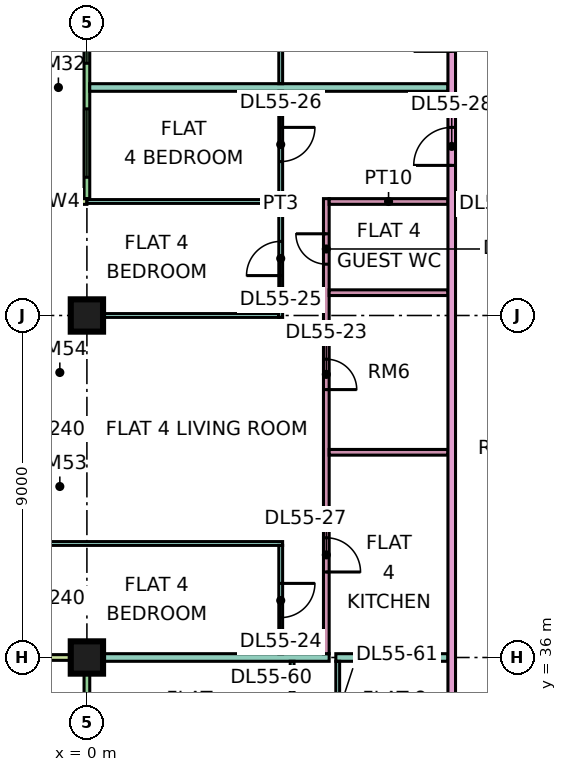
"""IFC4 building model, lengths in metres.
Left out: names, types, materials, properties, quantities, classifications, styles, units other than length and angle.
Written with IfcOpenShell. Run it as: python <this file> out.ifc"""

import sys

from ifc_helpers import new_model, si_unit, direction, frame, frame_2d, origin, origin_2d, place, context, subcontext, project, spatial, rectangle, extrude, element, fill, save


model = new_model("IFC4")
c1 = context("Model", 3, precision=1e-05, world=origin(), true_north=direction((0.0, 1.0)))
c2 = subcontext(c1, "Body", "Model", "MODEL_VIEW")
j1 = project(units=[si_unit("LENGTHUNIT", "METRE"), si_unit("PLANEANGLEUNIT", "RADIAN")], contexts=[c1])
p1 = place(None, origin())
s1 = spatial("IfcSite", under=j1, at=p1, CompositionType="ELEMENT")
p2 = place(p1, origin())
s2 = spatial("IfcBuilding", under=s1, at=p2, CompositionType="ELEMENT")
p3 = place(p2, frame((0.0, 0.0, 234.15)))
s3 = spatial("IfcBuildingStorey", under=s2, at=p3, CompositionType="ELEMENT", Elevation=234.15)
p4 = place(p3, frame((0.0, 36.0, 0.0), z_axis=(0.0, 0.0, 1.0), x_axis=(1.0, 0.0, 0.0)))
e1 = element("IfcColumn", 1, at=p4, inside=s3, PredefinedType="COLUMN", context=c2, shape_type="SweptSolid", body=[
    extrude(rectangle(XDim=0.85, YDim=0.85, at=origin_2d()), origin(), (0.0, 0.0, 1.0), 3.75),
])
p5 = place(p3, frame((0.0, 45.0, 0.0), z_axis=(0.0, 0.0, 1.0), x_axis=(1.0, 0.0, 0.0)))
e2 = element("IfcColumn", 2, at=p5, inside=s3, PredefinedType="COLUMN", context=c2, shape_type="SweptSolid", body=[
    extrude(rectangle(XDim=0.85, YDim=0.85, at=origin_2d()), origin(), (0.0, 0.0, 1.0), 3.75),
])
p6 = place(p3, frame((0.0, 61.425, 0.0), z_axis=(0.0, 0.0, 1.0), x_axis=(0.0, -1.0, 0.0)))
e3 = element("IfcWall", 3, at=p6, inside=s3, PredefinedType="SOLIDWALL", context=c2, shape_type="SweptSolid", body=[
    extrude(rectangle(XDim=13.35, YDim=0.15, at=frame_2d((6.675, 0.0))), origin(), (0.0, 0.0, 1.0), 3.35),
])
p7 = place(p6, frame((1.312, 0.0, 0.0)))
e4 = element("IfcOpeningElement", 4, at=p7, cuts=e3, PredefinedType="OPENING", context=c2, shape_type="SweptSolid", body=[
    extrude(rectangle(XDim=1.8, YDim=2.4, at=frame_2d((0.9, 1.2))), frame((0.0, 0.085, 0.0), z_axis=(0.0, -1.0, 0.0), x_axis=(1.0, 0.0, 0.0)), (0.0, 0.0, 1.0), 0.17),
])
p8 = place(p6, frame((5.062, 0.0, 0.45)))
e5 = element("IfcOpeningElement", 5, at=p8, cuts=e3, PredefinedType="OPENING", context=c2, shape_type="SweptSolid", body=[
    extrude(rectangle(XDim=1.2, YDim=2.4, at=frame_2d((0.6, 1.2))), frame((0.0, 0.085, 0.0), z_axis=(0.0, -1.0, 0.0), x_axis=(1.0, 0.0, 0.0)), (0.0, 0.0, 1.0), 0.17),
])
p9 = place(p6, frame((8.587, 0.0, 0.45)))
e6 = element("IfcOpeningElement", 6, at=p9, cuts=e3, PredefinedType="OPENING", context=c2, shape_type="SweptSolid", body=[
    extrude(rectangle(XDim=1.2, YDim=2.4, at=frame_2d((0.6, 1.2))), frame((0.0, 0.085, 0.0), z_axis=(0.0, -1.0, 0.0), x_axis=(1.0, 0.0, 0.0)), (0.0, 0.0, 1.0), 0.17),
])
p10 = place(p6, frame((10.988, 0.0, 0.45)))
e7 = element("IfcOpeningElement", 7, at=p10, cuts=e3, PredefinedType="OPENING", context=c2, shape_type="SweptSolid", body=[
    extrude(rectangle(XDim=1.8, YDim=2.4, at=frame_2d((0.9, 1.2))), frame((0.0, 0.085, 0.0), z_axis=(0.0, -1.0, 0.0), x_axis=(1.0, 0.0, 0.0)), (0.0, 0.0, 1.0), 0.17),
])
p11 = place(p3, frame((-1.5, 48.0, 0.0), z_axis=(0.0, 0.0, 1.0), x_axis=(1.0, 0.0, 0.0)))
e8 = element("IfcWall", 8, at=p11, inside=s3, PredefinedType="SOLIDWALL", context=c2, shape_type="SweptSolid", body=[
    extrude(rectangle(XDim=1.5, YDim=0.15, at=frame_2d((0.75, 0.0))), origin(), (0.0, 0.0, 1.0), 3.35),
])
p12 = place(p3, frame((0.0, 35.925, 0.0), z_axis=(0.0, 0.0, 1.0), x_axis=(0.0, -1.0, 0.0)))
e9 = element("IfcWall", 9, at=p12, inside=s3, PredefinedType="SOLIDWALL", context=c2, shape_type="SweptSolid", body=[
    extrude(rectangle(XDim=11.85, YDim=0.15, at=frame_2d((5.925, 0.0))), origin(), (0.0, 0.0, 1.0), 3.35),
])
p13 = place(p12, frame((1.087, 0.0, 0.0)))
e10 = element("IfcOpeningElement", 10, at=p13, cuts=e9, PredefinedType="OPENING", context=c2, shape_type="SweptSolid", body=[
    extrude(rectangle(XDim=1.2, YDim=2.4, at=frame_2d((0.6, 1.2))), frame((0.0, 0.085, 0.0), z_axis=(0.0, -1.0, 0.0), x_axis=(1.0, 0.0, 0.0)), (0.0, 0.0, 1.0), 0.17),
])
p14 = place(p12, frame((3.525, 0.0, 0.45)))
e11 = element("IfcOpeningElement", 11, at=p14, cuts=e9, PredefinedType="OPENING", context=c2, shape_type="SweptSolid", body=[
    extrude(rectangle(XDim=1.8, YDim=2.4, at=frame_2d((0.9, 1.2))), frame((0.0, 0.085, 0.0), z_axis=(0.0, -1.0, 0.0), x_axis=(1.0, 0.0, 0.0)), (0.0, 0.0, 1.0), 0.17),
])
p15 = place(p12, frame((7.163, 0.0, 0.45)))
e12 = element("IfcOpeningElement", 12, at=p15, cuts=e9, PredefinedType="OPENING", context=c2, shape_type="SweptSolid", body=[
    extrude(rectangle(XDim=3.0, YDim=2.4, at=frame_2d((1.5, 1.2))), frame((0.0, 0.085, 0.0), z_axis=(0.0, -1.0, 0.0), x_axis=(1.0, 0.0, 0.0)), (0.0, 0.0, 1.0), 0.17),
])
p16 = place(p3, frame((-1.5, 36.0, 0.0), z_axis=(0.0, 0.0, 1.0), x_axis=(1.0, 0.0, 0.0)))
e13 = element("IfcWall", 13, at=p16, inside=s3, PredefinedType="SOLIDWALL", context=c2, shape_type="SweptSolid", body=[
    extrude(rectangle(XDim=1.5, YDim=0.15, at=frame_2d((0.75, 0.0))), origin(), (0.0, 0.0, 1.0), 3.35),
])
e14 = element("IfcWall", 14, at=p4, inside=s3, PredefinedType="PARTITIONING", context=c2, shape_type="SweptSolid", body=[
    extrude(rectangle(XDim=6.375, YDim=0.2, at=frame_2d((3.188, 0.0))), origin(), (0.0, 0.0, 1.0), 3.35),
])
p17 = place(p3, frame((-1.35, 39.0, 0.0), z_axis=(0.0, 0.0, 1.0), x_axis=(1.0, 0.0, 0.0)))
e15 = element("IfcWall", 15, at=p17, inside=s3, PredefinedType="PARTITIONING", context=c2, shape_type="SweptSolid", body=[
    extrude(rectangle(XDim=6.5, YDim=0.1, at=frame_2d((3.25, 0.0))), origin(), (0.0, 0.0, 1.0), 3.35),
])
e16 = element("IfcWall", 16, at=p5, inside=s3, PredefinedType="PARTITIONING", context=c2, shape_type="SweptSolid", body=[
    extrude(rectangle(XDim=5.05, YDim=0.1, at=frame_2d((2.525, 0.0))), origin(), (0.0, 0.0, 1.0), 3.35),
])
p18 = place(p3, frame((0.0, 48.0, 0.0), z_axis=(0.0, 0.0, 1.0), x_axis=(1.0, 0.0, 0.0)))
e17 = element("IfcWall", 17, at=p18, inside=s3, PredefinedType="PARTITIONING", context=c2, shape_type="SweptSolid", body=[
    extrude(rectangle(XDim=5.05, YDim=0.1, at=frame_2d((2.525, 0.0))), origin(), (0.0, 0.0, 1.0), 3.35),
])
p19 = place(p3, frame((0.074, 51.0, 0.0), z_axis=(0.0, 0.0, 1.0), x_axis=(1.0, 0.0, 0.0)))
e18 = element("IfcWall", 18, at=p19, inside=s3, PredefinedType="PARTITIONING", context=c2, shape_type="SweptSolid", body=[
    extrude(rectangle(XDim=9.426, YDim=0.2, at=frame_2d((4.713, 0.0))), origin(), (0.0, 0.0, 1.0), 3.35),
])
p20 = place(p3, frame((5.1, 36.1, 0.0), z_axis=(0.0, 0.0, 1.0), x_axis=(0.0, 1.0, 0.0)))
e19 = element("IfcWall", 19, at=p20, inside=s3, PredefinedType="PARTITIONING", context=c2, shape_type="SweptSolid", body=[
    extrude(rectangle(XDim=2.85, YDim=0.1, at=frame_2d((1.425, 0.0))), origin(), (0.0, 0.0, 1.0), 3.35),
])
p21 = place(p20, frame((0.95, 0.0, 0.0)))
e20 = element("IfcOpeningElement", 20, at=p21, cuts=e19, PredefinedType="OPENING", context=c2, shape_type="SweptSolid", body=[
    extrude(rectangle(XDim=0.9, YDim=2.1, at=frame_2d((0.45, 1.05))), frame((0.0, 0.06, 0.0), z_axis=(0.0, -1.0, 0.0), x_axis=(1.0, 0.0, 0.0)), (0.0, 0.0, 1.0), 0.12),
])
p22 = place(p3, frame((5.1, 44.95, 0.0), z_axis=(0.0, 0.0, 1.0), x_axis=(0.0, 1.0, 0.0)))
e21 = element("IfcWall", 21, at=p22, inside=s3, PredefinedType="PARTITIONING", context=c2, shape_type="SweptSolid", body=[
    extrude(rectangle(XDim=5.95, YDim=0.1, at=frame_2d((2.975, 0.0))), origin(), (0.0, 0.0, 1.0), 3.35),
])
p23 = place(p22, frame((1.1, 0.0, 0.0)))
e22 = element("IfcOpeningElement", 22, at=p23, cuts=e21, PredefinedType="OPENING", context=c2, shape_type="SweptSolid", body=[
    extrude(rectangle(XDim=0.9, YDim=2.1, at=frame_2d((0.45, 1.05))), frame((0.0, 0.06, 0.0), z_axis=(0.0, -1.0, 0.0), x_axis=(1.0, 0.0, 0.0)), (0.0, 0.0, 1.0), 0.12),
])
p24 = place(p22, frame((4.1, 0.0, 0.0)))
e23 = element("IfcOpeningElement", 23, at=p24, cuts=e21, PredefinedType="OPENING", context=c2, shape_type="SweptSolid", body=[
    extrude(rectangle(XDim=0.9, YDim=2.1, at=frame_2d((0.45, 1.05))), frame((0.0, 0.06, 0.0), z_axis=(0.0, -1.0, 0.0), x_axis=(1.0, 0.0, 0.0)), (0.0, 0.0, 1.0), 0.12),
])
p25 = place(p3, frame((5.1, 51.1, 0.0), z_axis=(0.0, 0.0, 1.0), x_axis=(0.0, 1.0, 0.0)))
e24 = element("IfcWall", 24, at=p25, inside=s3, PredefinedType="PARTITIONING", context=c2, shape_type="SweptSolid", body=[
    extrude(rectangle(XDim=5.95, YDim=0.1, at=frame_2d((2.975, 0.0))), origin(), (0.0, 0.0, 1.0), 3.35),
])
p26 = place(p25, frame((0.95, 0.0, 0.0)))
e25 = element("IfcOpeningElement", 25, at=p26, cuts=e24, PredefinedType="OPENING", context=c2, shape_type="SweptSolid", body=[
    extrude(rectangle(XDim=0.9, YDim=2.1, at=frame_2d((0.45, 1.05))), frame((0.0, 0.06, 0.0), z_axis=(0.0, -1.0, 0.0), x_axis=(1.0, 0.0, 0.0)), (0.0, 0.0, 1.0), 0.12),
])
p27 = place(p25, frame((3.95, 0.0, 0.0)))
e26 = element("IfcOpeningElement", 26, at=p27, cuts=e24, PredefinedType="OPENING", context=c2, shape_type="SweptSolid", body=[
    extrude(rectangle(XDim=0.9, YDim=2.1, at=frame_2d((0.45, 1.05))), frame((0.0, 0.06, 0.0), z_axis=(0.0, -1.0, 0.0), x_axis=(1.0, 0.0, 0.0)), (0.0, 0.0, 1.0), 0.12),
])
p28 = place(p3, frame((5.4, 29.95, 0.0), z_axis=(0.0, 0.0, 1.0), x_axis=(0.0, 1.0, 0.0)))
e27 = element("IfcWall", 27, at=p28, inside=s3, PredefinedType="PARTITIONING", context=c2, shape_type="SweptSolid", body=[
    extrude(rectangle(XDim=5.95, YDim=0.1, at=frame_2d((2.975, 0.0))), origin(), (0.0, 0.0, 1.0), 3.35),
])
p29 = place(p28, frame((1.1, 0.0, 0.0)))
e28 = element("IfcOpeningElement", 28, at=p29, cuts=e27, PredefinedType="OPENING", context=c2, shape_type="SweptSolid", body=[
    extrude(rectangle(XDim=0.9, YDim=2.1, at=frame_2d((0.45, 1.05))), frame((0.0, 0.06, 0.0), z_axis=(0.0, -1.0, 0.0), x_axis=(1.0, 0.0, 0.0)), (0.0, 0.0, 1.0), 0.12),
])
p30 = place(p28, frame((4.1, 0.0, 0.0)))
e29 = element("IfcOpeningElement", 29, at=p30, cuts=e27, PredefinedType="OPENING", context=c2, shape_type="SweptSolid", body=[
    extrude(rectangle(XDim=0.9, YDim=2.1, at=frame_2d((0.45, 1.05))), frame((0.0, 0.06, 0.0), z_axis=(0.0, -1.0, 0.0), x_axis=(1.0, 0.0, 0.0)), (0.0, 0.0, 1.0), 0.12),
])
p31 = place(p3, frame((6.3, 36.1, 0.0), z_axis=(0.0, 0.0, 1.0), x_axis=(0.0, 1.0, 0.0)))
e30 = element("IfcWall", 30, at=p31, inside=s3, PredefinedType="PARTITIONING", context=c2, shape_type="SweptSolid", body=[
    extrude(rectangle(XDim=11.975, YDim=0.15, at=frame_2d((5.987, 0.0))), origin(), (0.0, 0.0, 1.0), 3.35),
])
p32 = place(p31, frame((6.95, 0.0, 0.0)))
e31 = element("IfcOpeningElement", 31, at=p32, cuts=e30, PredefinedType="OPENING", context=c2, shape_type="SweptSolid", body=[
    extrude(rectangle(XDim=0.8, YDim=2.1, at=frame_2d((0.4, 1.05))), frame((0.0, 0.085, 0.0), z_axis=(0.0, -1.0, 0.0), x_axis=(1.0, 0.0, 0.0)), (0.0, 0.0, 1.0), 0.17),
])
p33 = place(p31, frame((2.15, 0.0, 0.0)))
e32 = element("IfcOpeningElement", 32, at=p33, cuts=e30, PredefinedType="OPENING", context=c2, shape_type="SweptSolid", body=[
    extrude(rectangle(XDim=0.9, YDim=2.1, at=frame_2d((0.45, 1.05))), frame((0.0, 0.085, 0.0), z_axis=(0.0, -1.0, 0.0), x_axis=(1.0, 0.0, 0.0)), (0.0, 0.0, 1.0), 0.17),
])
p34 = place(p31, frame((10.25, 0.0, 0.0)))
e33 = element("IfcOpeningElement", 33, at=p34, cuts=e30, PredefinedType="OPENING", context=c2, shape_type="SweptSolid", body=[
    extrude(rectangle(XDim=0.8, YDim=2.1, at=frame_2d((0.4, 1.05))), frame((0.0, 0.085, 0.0), z_axis=(0.0, -1.0, 0.0), x_axis=(1.0, 0.0, 0.0)), (0.0, 0.0, 1.0), 0.17),
])
for number, where, z_axis, x_axis in (
    (34, (6.375, 41.4, 0.0), (0.0, 0.0, 1.0), (1.0, 0.0, 0.0)),
    (35, (6.375, 45.6, 0.0), (0.0, 0.0, 1.0), (1.0, 0.0, 0.0)),
    (36, (6.375, 48.0, 0.0), (0.0, 0.0, 1.0), (1.0, 0.0, 0.0)),
):
    element("IfcWall", number, at=place(p3, frame(where, z_axis=z_axis, x_axis=x_axis)), inside=s3, PredefinedType="PARTITIONING", context=c2, shape_type="SweptSolid", body=[
        extrude(rectangle(XDim=3.125, YDim=0.15, at=frame_2d((1.562, 0.0))), origin(), (0.0, 0.0, 1.0), 3.35),
    ])
p35 = place(p3, frame((6.55, 36.0, 0.0), z_axis=(0.0, 0.0, 1.0), x_axis=(1.0, 0.0, 0.0)))
e37 = element("IfcWall", 37, at=p35, inside=s3, PredefinedType="PARTITIONING", context=c2, shape_type="SweptSolid", body=[
    extrude(rectangle(XDim=2.95, YDim=0.2, at=frame_2d((1.475, 0.0))), origin(), (0.0, 0.0, 1.0), 3.35),
])
p36 = place(p3, frame((6.6, 32.95, 0.0), z_axis=(0.0, 0.0, 1.0), x_axis=(0.0, 1.0, 0.0)))
e38 = element("IfcWall", 38, at=p36, inside=s3, PredefinedType="PARTITIONING", context=c2, shape_type="SweptSolid", body=[
    extrude(rectangle(XDim=2.95, YDim=0.1, at=frame_2d((1.475, 0.0))), origin(), (0.0, 0.0, 1.0), 3.35),
])
p37 = place(p36, frame((1.1, 0.0, 0.0)))
e39 = element("IfcOpeningElement", 39, at=p37, cuts=e38, PredefinedType="OPENING", context=c2, shape_type="SweptSolid", body=[
    extrude(rectangle(XDim=0.9, YDim=2.1, at=frame_2d((0.45, 1.05))), frame((0.0, 0.06, 0.0), z_axis=(0.0, -1.0, 0.0), x_axis=(1.0, 0.0, 0.0)), (0.0, 0.0, 1.0), 0.12),
])
p38 = place(p3, frame((9.6, 20.0, 0.0), z_axis=(0.0, 0.0, 1.0), x_axis=(0.0, 1.0, 0.0)))
e40 = element("IfcWall", 40, at=p38, inside=s3, PredefinedType="PARTITIONING", context=c2, shape_type="SweptSolid", body=[
    extrude(rectangle(XDim=42.926, YDim=0.2, at=frame_2d((21.463, 0.0))), origin(), (0.0, 0.0, 1.0), 3.35),
])
p39 = place(p38, frame((28.95, 0.0, 0.0)))
e41 = element("IfcOpeningElement", 41, at=p39, cuts=e40, PredefinedType="OPENING", context=c2, shape_type="SweptSolid", body=[
    extrude(rectangle(XDim=1.0, YDim=2.1, at=frame_2d((0.5, 1.05))), frame((0.0, 0.11, 0.0), z_axis=(0.0, -1.0, 0.0), x_axis=(1.0, 0.0, 0.0)), (0.0, 0.0, 1.0), 0.22),
])
p40 = place(p38, frame((31.95, 0.0, 0.0)))
e42 = element("IfcOpeningElement", 42, at=p40, cuts=e40, PredefinedType="OPENING", context=c2, shape_type="SweptSolid", body=[
    extrude(rectangle(XDim=1.0, YDim=2.1, at=frame_2d((0.5, 1.05))), frame((0.0, 0.11, 0.0), z_axis=(0.0, -1.0, 0.0), x_axis=(1.0, 0.0, 0.0)), (0.0, 0.0, 1.0), 0.22),
])
p41 = place(p38, frame((0.6, 0.0, 0.0)))
e43 = element("IfcOpeningElement", 43, at=p41, cuts=e40, PredefinedType="OPENING", context=c2, shape_type="SweptSolid", body=[
    extrude(rectangle(XDim=1.2, YDim=2.1, at=frame_2d((0.6, 1.05))), frame((0.0, 0.11, 0.0), z_axis=(0.0, -1.0, 0.0), x_axis=(1.0, 0.0, 0.0)), (0.0, 0.0, 1.0), 0.22),
])
p42 = place(p38, frame((11.25, 0.0, 0.0)))
e44 = element("IfcOpeningElement", 44, at=p42, cuts=e40, PredefinedType="OPENING", context=c2, shape_type="SweptSolid", body=[
    extrude(rectangle(XDim=1.0, YDim=2.1, at=frame_2d((0.5, 1.05))), frame((0.0, 0.11, 0.0), z_axis=(0.0, -1.0, 0.0), x_axis=(1.0, 0.0, 0.0)), (0.0, 0.0, 1.0), 0.22),
])
p43 = place(p9, origin())
e45 = element("IfcWindow", 45, at=p43, inside=s3, PartitioningType="SINGLE_PANEL", PredefinedType="WINDOW", context=c2, shape_type="SweptSolid", body=[
    extrude(rectangle(XDim=1.2, YDim=2.4, at=frame_2d((0.6, 1.2))), frame((0.0, 0.03, 0.0), z_axis=(0.0, -1.0, 0.0), x_axis=(1.0, 0.0, 0.0)), (0.0, 0.0, 1.0), 0.06),
])
fill(e6, e45)
p44 = place(p10, origin())
e46 = element("IfcWindow", 46, at=p44, inside=s3, PartitioningType="SINGLE_PANEL", PredefinedType="WINDOW", context=c2, shape_type="SweptSolid", body=[
    extrude(rectangle(XDim=1.8, YDim=2.4, at=frame_2d((0.9, 1.2))), frame((0.0, 0.03, 0.0), z_axis=(0.0, -1.0, 0.0), x_axis=(1.0, 0.0, 0.0)), (0.0, 0.0, 1.0), 0.06),
])
fill(e7, e46)
p45 = place(p32, frame((0.8, 0.0, 0.0), z_axis=(0.0, 0.0, 1.0), x_axis=(-1.0, 0.0, 0.0)))
e47 = element("IfcDoor", 47, at=p45, inside=s3, OperationType="SINGLE_SWING_LEFT", PredefinedType="DOOR", context=c2, shape_type="SweptSolid", body=[
    extrude(rectangle(XDim=0.8, YDim=2.1, at=frame_2d((0.4, 1.05))), frame((0.0, 0.025, 0.0), z_axis=(0.0, -1.0, 0.0), x_axis=(1.0, 0.0, 0.0)), (0.0, 0.0, 1.0), 0.05),
])
fill(e31, e47)
p46 = place(p21, origin())
e48 = element("IfcDoor", 48, at=p46, inside=s3, OperationType="SINGLE_SWING_RIGHT", PredefinedType="DOOR", context=c2, shape_type="SweptSolid", body=[
    extrude(rectangle(XDim=0.9, YDim=2.1, at=frame_2d((0.45, 1.05))), frame((0.0, 0.025, 0.0), z_axis=(0.0, -1.0, 0.0), x_axis=(1.0, 0.0, 0.0)), (0.0, 0.0, 1.0), 0.05),
])
fill(e20, e48)
p47 = place(p23, origin())
e49 = element("IfcDoor", 49, at=p47, inside=s3, OperationType="SINGLE_SWING_LEFT", PredefinedType="DOOR", context=c2, shape_type="SweptSolid", body=[
    extrude(rectangle(XDim=0.9, YDim=2.1, at=frame_2d((0.45, 1.05))), frame((0.0, 0.025, 0.0), z_axis=(0.0, -1.0, 0.0), x_axis=(1.0, 0.0, 0.0)), (0.0, 0.0, 1.0), 0.05),
])
fill(e22, e49)
p48 = place(p24, origin())
e50 = element("IfcDoor", 50, at=p48, inside=s3, OperationType="SINGLE_SWING_RIGHT", PredefinedType="DOOR", context=c2, shape_type="SweptSolid", body=[
    extrude(rectangle(XDim=0.9, YDim=2.1, at=frame_2d((0.45, 1.05))), frame((0.0, 0.025, 0.0), z_axis=(0.0, -1.0, 0.0), x_axis=(1.0, 0.0, 0.0)), (0.0, 0.0, 1.0), 0.05),
])
fill(e23, e50)
p49 = place(p33, frame((0.9, 0.0, 0.0), z_axis=(0.0, 0.0, 1.0), x_axis=(-1.0, 0.0, 0.0)))
e51 = element("IfcDoor", 51, at=p49, inside=s3, OperationType="SINGLE_SWING_LEFT", PredefinedType="DOOR", context=c2, shape_type="SweptSolid", body=[
    extrude(rectangle(XDim=0.9, YDim=2.1, at=frame_2d((0.45, 1.05))), frame((0.0, 0.025, 0.0), z_axis=(0.0, -1.0, 0.0), x_axis=(1.0, 0.0, 0.0)), (0.0, 0.0, 1.0), 0.05),
])
fill(e32, e51)
p50 = place(p39, origin())
e52 = element("IfcDoor", 52, at=p50, inside=s3, OperationType="SINGLE_SWING_LEFT", PredefinedType="DOOR", context=c2, shape_type="SweptSolid", body=[
    extrude(rectangle(XDim=1.0, YDim=2.1, at=frame_2d((0.5, 1.05))), frame((0.0, 0.025, 0.0), z_axis=(0.0, -1.0, 0.0), x_axis=(1.0, 0.0, 0.0)), (0.0, 0.0, 1.0), 0.05),
])
fill(e41, e52)
p51 = place(p34, frame((0.8, 0.0, 0.0), z_axis=(0.0, 0.0, 1.0), x_axis=(-1.0, 0.0, 0.0)))
e53 = element("IfcDoor", 53, at=p51, inside=s3, OperationType="SINGLE_SWING_RIGHT", PredefinedType="DOOR", context=c2, shape_type="SweptSolid", body=[
    extrude(rectangle(XDim=0.8, YDim=2.1, at=frame_2d((0.4, 1.05))), frame((0.0, 0.025, 0.0), z_axis=(0.0, -1.0, 0.0), x_axis=(1.0, 0.0, 0.0)), (0.0, 0.0, 1.0), 0.05),
])
fill(e33, e53)
save(model, sys.argv[1])
